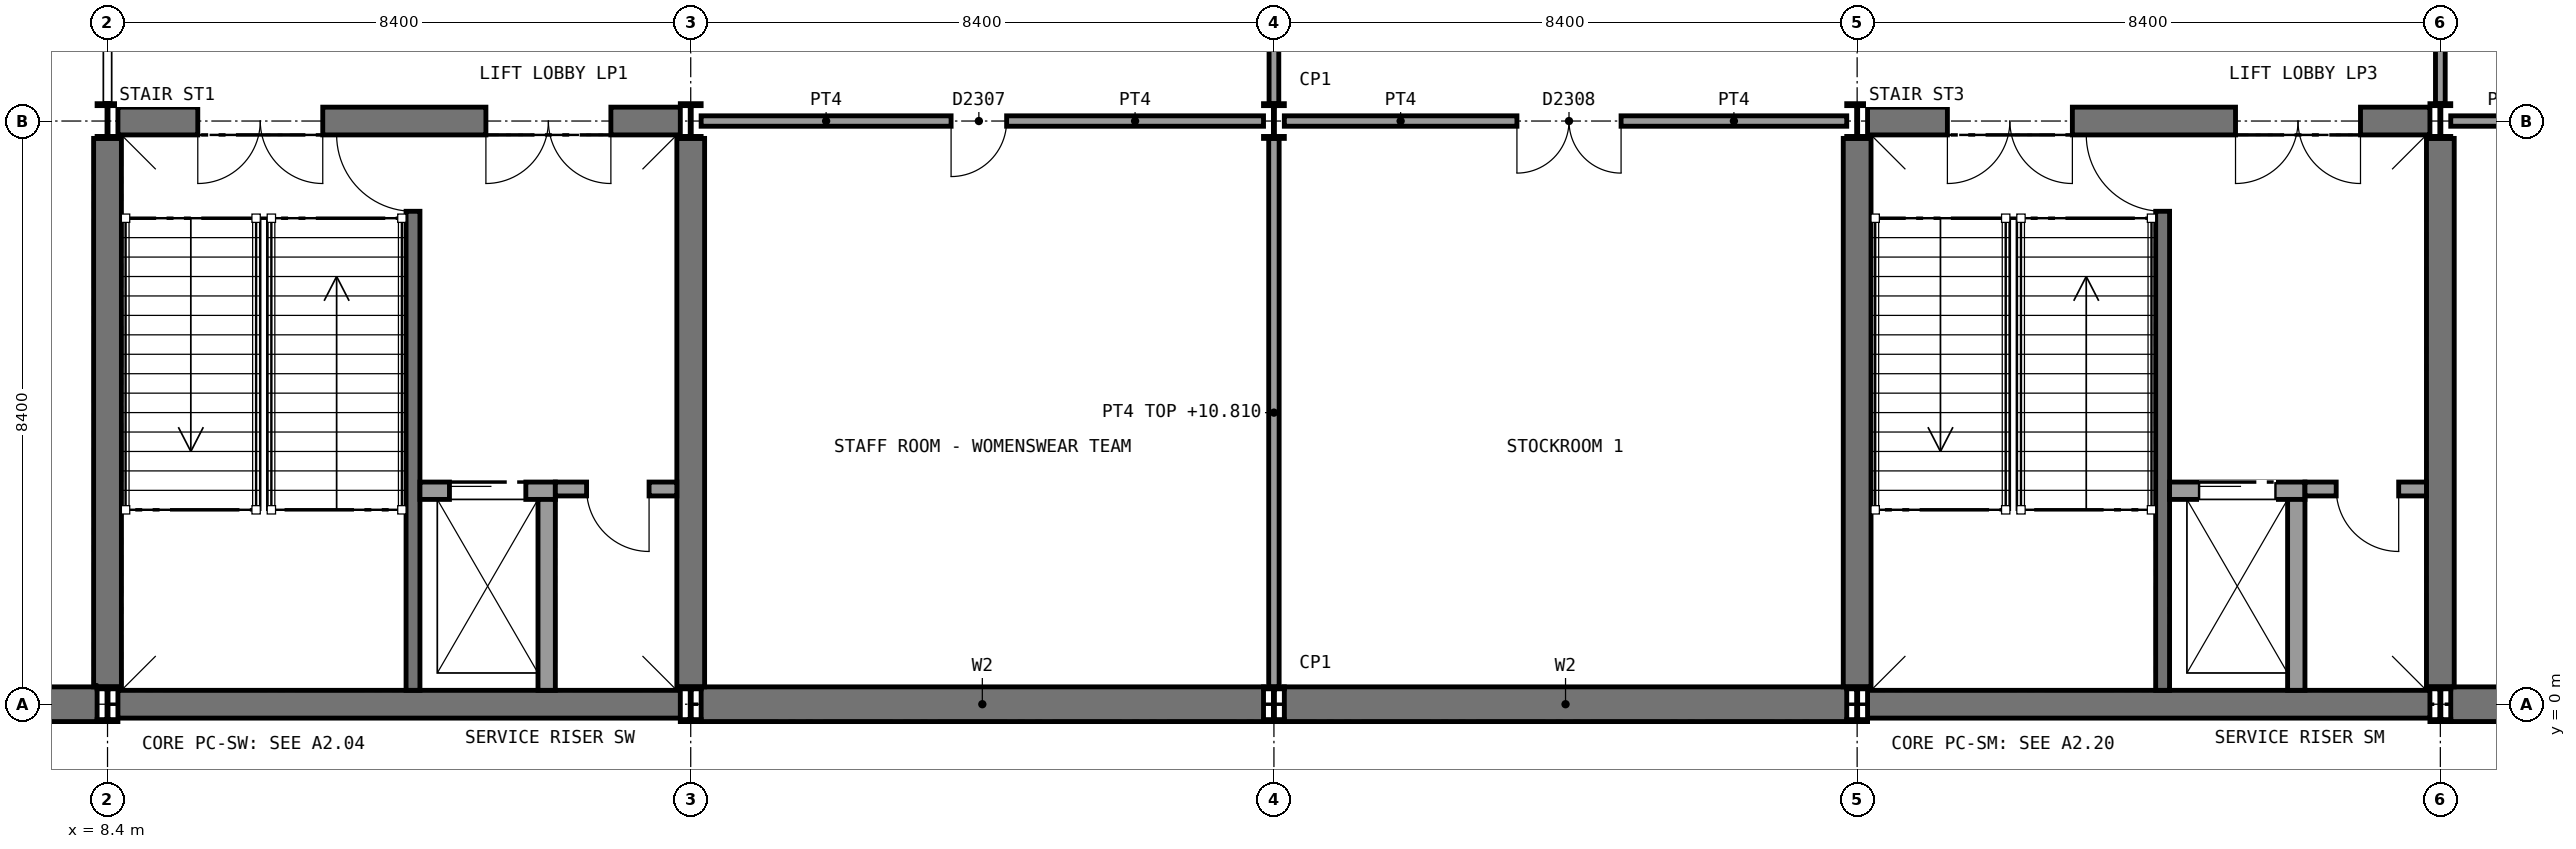
"""IFC4 building model, lengths in metres.
Left out: names, types, materials, properties, quantities, classifications, styles, units other than length and angle.
Written with IfcOpenShell. Run it as: python <this file> out.ifc"""

import sys

from ifc_helpers import new_model, si_unit, direction, frame, frame_2d, origin, origin_2d, place, context, subcontext, project, spatial, rectangle, i_section, extrude, element, fill, save


model = new_model("IFC4")
c1 = context("Model", 3, precision=1e-05, world=origin(), true_north=direction((0.0, 1.0)))
c2 = subcontext(c1, "Body", "Model", "MODEL_VIEW")
j1 = project(units=[si_unit("LENGTHUNIT", "METRE"), si_unit("PLANEANGLEUNIT", "RADIAN")], contexts=[c1])
p1 = place(None, origin())
s1 = spatial("IfcSite", under=j1, at=p1, CompositionType="ELEMENT")
p2 = place(p1, origin())
s2 = spatial("IfcBuilding", under=s1, at=p2, CompositionType="ELEMENT")
p3 = place(p2, frame((0.0, 0.0, 6.0)))
s3 = spatial("IfcBuildingStorey", under=s2, at=p3, CompositionType="ELEMENT", Elevation=6.0)
p4 = place(p3, frame((0.305, 0.0, 0.0), z_axis=(0.0, 0.0, 1.0), x_axis=(1.0, 0.0, 0.0)))
e1 = element("IfcWall", 1, at=p4, inside=s3, PredefinedType="SHEAR", context=c2, shape_type="SweptSolid", body=[
    extrude(rectangle(XDim=7.945, YDim=0.5, at=frame_2d((3.973, 0.0))), origin(), (0.0, 0.0, 1.0), 5.25),
])
p5 = place(p3, frame((16.95, 0.0, 0.0), z_axis=(0.0, 0.0, 1.0), x_axis=(1.0, 0.0, 0.0)))
e2 = element("IfcWall", 2, at=p5, inside=s3, PredefinedType="SHEAR", context=c2, shape_type="SweptSolid", body=[
    extrude(rectangle(XDim=8.1, YDim=0.5, at=frame_2d((4.05, 0.0))), origin(), (0.0, 0.0, 1.0), 5.25),
])
p6 = place(p3, frame((25.35, 0.0, 0.0), z_axis=(0.0, 0.0, 1.0), x_axis=(1.0, 0.0, 0.0)))
e3 = element("IfcWall", 3, at=p6, inside=s3, PredefinedType="SHEAR", context=c2, shape_type="SweptSolid", body=[
    extrude(rectangle(XDim=8.1, YDim=0.5, at=frame_2d((4.05, 0.0))), origin(), (0.0, 0.0, 1.0), 5.25),
])
p7 = place(p3, frame((42.15, 0.0, 0.0), z_axis=(0.0, 0.0, 1.0), x_axis=(1.0, 0.0, 0.0)))
e4 = element("IfcWall", 4, at=p7, inside=s3, PredefinedType="SHEAR", context=c2, shape_type="SweptSolid", body=[
    extrude(rectangle(XDim=8.1, YDim=0.5, at=frame_2d((4.05, 0.0))), origin(), (0.0, 0.0, 1.0), 5.25),
])
p8 = place(p3, frame((8.55, 0.0, 0.0), z_axis=(0.0, 0.0, 1.0), x_axis=(1.0, 0.0, 0.0)))
e5 = element("IfcWall", 5, at=p8, inside=s3, PredefinedType="SHEAR", context=c2, shape_type="SweptSolid", body=[
    extrude(rectangle(XDim=8.1, YDim=0.4, at=frame_2d((4.05, 0.0))), origin(), (0.0, 0.0, 1.0), 5.25),
])
p9 = place(p3, frame((8.55, 8.4, 0.0), z_axis=(0.0, 0.0, 1.0), x_axis=(1.0, 0.0, 0.0)))
e6 = element("IfcWall", 6, at=p9, inside=s3, PredefinedType="SHEAR", context=c2, shape_type="SweptSolid", body=[
    extrude(rectangle(XDim=8.1, YDim=0.4, at=frame_2d((4.05, 0.0))), origin(), (0.0, 0.0, 1.0), 5.25),
])
p10 = place(p9, frame((1.15, 0.0, 0.0)))
e7 = element("IfcOpeningElement", 7, at=p10, cuts=e6, PredefinedType="OPENING", context=c2, shape_type="SweptSolid", body=[
    extrude(rectangle(XDim=1.8, YDim=2.1, at=frame_2d((0.9, 1.05))), frame((0.0, 0.21, 0.0), z_axis=(0.0, -1.0, 0.0), x_axis=(1.0, 0.0, 0.0)), (0.0, 0.0, 1.0), 0.42),
])
p11 = place(p9, frame((5.3, 0.0, 0.0)))
e8 = element("IfcOpeningElement", 8, at=p11, cuts=e6, PredefinedType="OPENING", context=c2, shape_type="SweptSolid", body=[
    extrude(rectangle(XDim=1.8, YDim=2.1, at=frame_2d((0.9, 1.05))), frame((0.0, 0.21, 0.0), z_axis=(0.0, -1.0, 0.0), x_axis=(1.0, 0.0, 0.0)), (0.0, 0.0, 1.0), 0.42),
])
for number, where, z_axis, x_axis in (
    (9, (8.4, 0.25, 0.0), (0.0, 0.0, 1.0), (0.0, 1.0, 0.0)),
    (10, (16.8, 0.25, 0.0), (0.0, 0.0, 1.0), (0.0, 1.0, 0.0)),
):
    element("IfcWall", number, at=place(p3, frame(where, z_axis=z_axis, x_axis=x_axis)), inside=s3, PredefinedType="SHEAR", context=c2, shape_type="SweptSolid", body=[
        extrude(rectangle(XDim=7.9, YDim=0.4, at=frame_2d((3.95, 0.0))), origin(), (0.0, 0.0, 1.0), 5.25),
    ])
p12 = place(p3, frame((33.75, 0.0, 0.0), z_axis=(0.0, 0.0, 1.0), x_axis=(1.0, 0.0, 0.0)))
e11 = element("IfcWall", 11, at=p12, inside=s3, PredefinedType="SHEAR", context=c2, shape_type="SweptSolid", body=[
    extrude(rectangle(XDim=8.1, YDim=0.4, at=frame_2d((4.05, 0.0))), origin(), (0.0, 0.0, 1.0), 5.25),
])
p13 = place(p3, frame((33.75, 8.4, 0.0), z_axis=(0.0, 0.0, 1.0), x_axis=(1.0, 0.0, 0.0)))
e12 = element("IfcWall", 12, at=p13, inside=s3, PredefinedType="SHEAR", context=c2, shape_type="SweptSolid", body=[
    extrude(rectangle(XDim=8.1, YDim=0.4, at=frame_2d((4.05, 0.0))), origin(), (0.0, 0.0, 1.0), 5.25),
])
p14 = place(p13, frame((1.15, 0.0, 0.0)))
e13 = element("IfcOpeningElement", 13, at=p14, cuts=e12, PredefinedType="OPENING", context=c2, shape_type="SweptSolid", body=[
    extrude(rectangle(XDim=1.8, YDim=2.1, at=frame_2d((0.9, 1.05))), frame((0.0, 0.21, 0.0), z_axis=(0.0, -1.0, 0.0), x_axis=(1.0, 0.0, 0.0)), (0.0, 0.0, 1.0), 0.42),
])
p15 = place(p13, frame((5.3, 0.0, 0.0)))
e14 = element("IfcOpeningElement", 14, at=p15, cuts=e12, PredefinedType="OPENING", context=c2, shape_type="SweptSolid", body=[
    extrude(rectangle(XDim=1.8, YDim=2.1, at=frame_2d((0.9, 1.05))), frame((0.0, 0.21, 0.0), z_axis=(0.0, -1.0, 0.0), x_axis=(1.0, 0.0, 0.0)), (0.0, 0.0, 1.0), 0.42),
])
for number, where, z_axis, x_axis in (
    (15, (33.6, 0.25, 0.0), (0.0, 0.0, 1.0), (0.0, 1.0, 0.0)),
    (16, (42.0, 0.25, 0.0), (0.0, 0.0, 1.0), (0.0, 1.0, 0.0)),
):
    element("IfcWall", number, at=place(p3, frame(where, z_axis=z_axis, x_axis=x_axis)), inside=s3, PredefinedType="SHEAR", context=c2, shape_type="SweptSolid", body=[
        extrude(rectangle(XDim=7.9, YDim=0.4, at=frame_2d((3.95, 0.0))), origin(), (0.0, 0.0, 1.0), 5.25),
    ])
for number, where, z_axis, x_axis in (
    (17, (8.4, 0.0, 0.0), (0.0, 0.0, 1.0), (1.0, 0.0, 0.0)),
    (18, (8.4, 8.4, 0.0), (0.0, 0.0, 1.0), (1.0, 0.0, 0.0)),
    (19, (16.8, 0.0, 0.0), (0.0, 0.0, 1.0), (1.0, 0.0, 0.0)),
    (20, (16.8, 8.4, 0.0), (0.0, 0.0, 1.0), (1.0, 0.0, 0.0)),
    (21, (25.2, 0.0, 0.0), (0.0, 0.0, 1.0), (1.0, 0.0, 0.0)),
    (22, (25.2, 8.4, 0.0), (0.0, 0.0, 1.0), (1.0, 0.0, 0.0)),
    (23, (33.6, 0.0, 0.0), (0.0, 0.0, 1.0), (1.0, 0.0, 0.0)),
    (24, (33.6, 8.4, 0.0), (0.0, 0.0, 1.0), (1.0, 0.0, 0.0)),
    (25, (42.0, 0.0, 0.0), (0.0, 0.0, 1.0), (1.0, 0.0, 0.0)),
    (26, (42.0, 8.4, 0.0), (0.0, 0.0, 1.0), (1.0, 0.0, 0.0)),
):
    element("IfcColumn", number, at=place(p3, frame(where, z_axis=z_axis, x_axis=x_axis)), inside=s3, PredefinedType="COLUMN", context=c2, shape_type="SweptSolid", body=[
        extrude(i_section(OverallWidth=0.3, OverallDepth=0.5, WebThickness=0.014, FlangeThickness=0.028, FilletRadius=0.027, at=origin_2d()), origin(), (0.0, 0.0, 1.0), 5.4),
    ])
p16 = place(p3, frame((25.2, 0.25, 0.0), z_axis=(0.0, 0.0, 1.0), x_axis=(0.0, 1.0, 0.0)))
e27 = element("IfcWall", 27, at=p16, inside=s3, PredefinedType="SOLIDWALL", context=c2, shape_type="SweptSolid", body=[
    extrude(rectangle(XDim=7.9, YDim=0.15, at=frame_2d((3.95, 0.0))), origin(), (0.0, 0.0, 1.0), 4.81),
])
p17 = place(p3, frame((16.95, 8.4, 0.0), z_axis=(0.0, 0.0, 1.0), x_axis=(1.0, 0.0, 0.0)))
e28 = element("IfcWall", 28, at=p17, inside=s3, PredefinedType="SOLIDWALL", context=c2, shape_type="SweptSolid", body=[
    extrude(rectangle(XDim=8.1, YDim=0.15, at=frame_2d((4.05, 0.0))), origin(), (0.0, 0.0, 1.0), 4.92),
])
p18 = place(p17, frame((3.6, 0.0, 0.0)))
e29 = element("IfcOpeningElement", 29, at=p18, cuts=e28, PredefinedType="OPENING", context=c2, shape_type="SweptSolid", body=[
    extrude(rectangle(XDim=0.8, YDim=2.1, at=frame_2d((0.4, 1.05))), frame((0.0, 0.085, 0.0), z_axis=(0.0, -1.0, 0.0), x_axis=(1.0, 0.0, 0.0)), (0.0, 0.0, 1.0), 0.17),
])
p19 = place(p3, frame((25.35, 8.4, 0.0), z_axis=(0.0, 0.0, 1.0), x_axis=(1.0, 0.0, 0.0)))
e30 = element("IfcWall", 30, at=p19, inside=s3, PredefinedType="SOLIDWALL", context=c2, shape_type="SweptSolid", body=[
    extrude(rectangle(XDim=8.1, YDim=0.15, at=frame_2d((4.05, 0.0))), origin(), (0.0, 0.0, 1.0), 4.92),
])
p20 = place(p19, frame((3.35, 0.0, 0.0)))
e31 = element("IfcOpeningElement", 31, at=p20, cuts=e30, PredefinedType="OPENING", context=c2, shape_type="SweptSolid", body=[
    extrude(rectangle(XDim=1.5, YDim=2.1, at=frame_2d((0.75, 1.05))), frame((0.0, 0.085, 0.0), z_axis=(0.0, -1.0, 0.0), x_axis=(1.0, 0.0, 0.0)), (0.0, 0.0, 1.0), 0.17),
])
p21 = place(p3, frame((42.15, 8.4, 0.0), z_axis=(0.0, 0.0, 1.0), x_axis=(1.0, 0.0, 0.0)))
e32 = element("IfcWall", 32, at=p21, inside=s3, PredefinedType="SOLIDWALL", context=c2, shape_type="SweptSolid", body=[
    extrude(rectangle(XDim=8.1, YDim=0.15, at=frame_2d((4.05, 0.0))), origin(), (0.0, 0.0, 1.0), 4.81),
])
p22 = place(p21, frame((3.35, 0.0, 0.0)))
e33 = element("IfcOpeningElement", 33, at=p22, cuts=e32, PredefinedType="OPENING", context=c2, shape_type="SweptSolid", body=[
    extrude(rectangle(XDim=1.5, YDim=2.1, at=frame_2d((0.75, 1.05))), frame((0.0, 0.085, 0.0), z_axis=(0.0, -1.0, 0.0), x_axis=(1.0, 0.0, 0.0)), (0.0, 0.0, 1.0), 0.17),
])
for number, where, z_axis, x_axis in (
    (34, (25.2, 8.65, 0.0), (0.0, 0.0, 1.0), (0.0, 1.0, 0.0)),
    (35, (42.0, 8.65, 0.0), (0.0, 0.0, 1.0), (0.0, 1.0, 0.0)),
):
    element("IfcWall", number, at=place(p3, frame(where, z_axis=z_axis, x_axis=x_axis)), inside=s3, PredefinedType="PARTITIONING", context=c2, shape_type="SweptSolid", body=[
        extrude(rectangle(XDim=3.1, YDim=0.14, at=frame_2d((1.55, 0.0))), origin(), (0.0, 0.0, 1.0), 4.81),
    ])
p23 = place(p3, frame((12.8, 0.2, 0.0), z_axis=(0.0, 0.0, 1.0), x_axis=(0.0, 1.0, 0.0)))
e36 = element("IfcWall", 36, at=p23, inside=s3, PredefinedType="SHEAR", context=c2, shape_type="SweptSolid", body=[
    extrude(rectangle(XDim=8.0, YDim=0.2, at=frame_2d((4.0, 0.0))), origin(), (0.0, 0.0, 1.0), 5.25),
])
p24 = place(p23, frame((6.9, 0.0, 0.0)))
e37 = element("IfcOpeningElement", 37, at=p24, cuts=e36, PredefinedType="OPENING", context=c2, shape_type="SweptSolid", body=[
    extrude(rectangle(XDim=1.11, YDim=2.1, at=frame_2d((0.555, 1.05))), frame((0.0, 0.11, 0.0), z_axis=(0.0, -1.0, 0.0), x_axis=(1.0, 0.0, 0.0)), (0.0, 0.0, 1.0), 0.22),
])
p25 = place(p3, frame((12.9, 3.075, 0.0), z_axis=(0.0, 0.0, 1.0), x_axis=(1.0, 0.0, 0.0)))
e38 = element("IfcWall", 38, at=p25, inside=s3, PredefinedType="SOLIDWALL", context=c2, shape_type="SweptSolid", body=[
    extrude(rectangle(XDim=1.95, YDim=0.25, at=frame_2d((0.975, 0.0))), origin(), (0.0, 0.0, 1.0), 5.4),
])
p26 = place(p25, frame((0.425, 0.0, 0.0)))
e39 = element("IfcOpeningElement", 39, at=p26, cuts=e38, PredefinedType="OPENING", context=c2, shape_type="SweptSolid", body=[
    extrude(rectangle(XDim=1.1, YDim=2.1, at=frame_2d((0.55, 1.05))), frame((0.0, 0.135, 0.0), z_axis=(0.0, -1.0, 0.0), x_axis=(1.0, 0.0, 0.0)), (0.0, 0.0, 1.0), 0.27),
])
p27 = place(p3, frame((14.725, 0.2, 0.0), z_axis=(0.0, 0.0, 1.0), x_axis=(0.0, 1.0, 0.0)))
e40 = element("IfcWall", 40, at=p27, inside=s3, PredefinedType="SOLIDWALL", context=c2, shape_type="SweptSolid", body=[
    extrude(rectangle(XDim=2.75, YDim=0.25, at=frame_2d((1.375, 0.0))), origin(), (0.0, 0.0, 1.0), 5.4),
])
p28 = place(p3, frame((14.85, 3.1, 0.0), z_axis=(0.0, 0.0, 1.0), x_axis=(1.0, 0.0, 0.0)))
e41 = element("IfcWall", 41, at=p28, inside=s3, PredefinedType="PARTITIONING", context=c2, shape_type="SweptSolid", body=[
    extrude(rectangle(XDim=1.75, YDim=0.2, at=frame_2d((0.875, 0.0))), origin(), (0.0, 0.0, 1.0), 5.25),
])
p29 = place(p28, frame((0.45, 0.0, 0.0)))
e42 = element("IfcOpeningElement", 42, at=p29, cuts=e41, PredefinedType="OPENING", context=c2, shape_type="SweptSolid", body=[
    extrude(rectangle(XDim=0.9, YDim=2.1, at=frame_2d((0.45, 1.05))), frame((0.0, 0.11, 0.0), z_axis=(0.0, -1.0, 0.0), x_axis=(1.0, 0.0, 0.0)), (0.0, 0.0, 1.0), 0.22),
])
p30 = place(p3, frame((38.0, 0.2, 0.0), z_axis=(0.0, 0.0, 1.0), x_axis=(0.0, 1.0, 0.0)))
e43 = element("IfcWall", 43, at=p30, inside=s3, PredefinedType="SHEAR", context=c2, shape_type="SweptSolid", body=[
    extrude(rectangle(XDim=8.0, YDim=0.2, at=frame_2d((4.0, 0.0))), origin(), (0.0, 0.0, 1.0), 5.25),
])
p31 = place(p30, frame((6.9, 0.0, 0.0)))
e44 = element("IfcOpeningElement", 44, at=p31, cuts=e43, PredefinedType="OPENING", context=c2, shape_type="SweptSolid", body=[
    extrude(rectangle(XDim=1.11, YDim=2.1, at=frame_2d((0.555, 1.05))), frame((0.0, 0.11, 0.0), z_axis=(0.0, -1.0, 0.0), x_axis=(1.0, 0.0, 0.0)), (0.0, 0.0, 1.0), 0.22),
])
p32 = place(p3, frame((38.1, 3.075, 0.0), z_axis=(0.0, 0.0, 1.0), x_axis=(1.0, 0.0, 0.0)))
e45 = element("IfcWall", 45, at=p32, inside=s3, PredefinedType="SOLIDWALL", context=c2, shape_type="SweptSolid", body=[
    extrude(rectangle(XDim=1.95, YDim=0.25, at=frame_2d((0.975, 0.0))), origin(), (0.0, 0.0, 1.0), 5.4),
])
p33 = place(p32, frame((0.425, 0.0, 0.0)))
e46 = element("IfcOpeningElement", 46, at=p33, cuts=e45, PredefinedType="OPENING", context=c2, shape_type="SweptSolid", body=[
    extrude(rectangle(XDim=1.1, YDim=2.1, at=frame_2d((0.55, 1.05))), frame((0.0, 0.135, 0.0), z_axis=(0.0, -1.0, 0.0), x_axis=(1.0, 0.0, 0.0)), (0.0, 0.0, 1.0), 0.27),
])
p34 = place(p3, frame((39.925, 0.2, 0.0), z_axis=(0.0, 0.0, 1.0), x_axis=(0.0, 1.0, 0.0)))
e47 = element("IfcWall", 47, at=p34, inside=s3, PredefinedType="SOLIDWALL", context=c2, shape_type="SweptSolid", body=[
    extrude(rectangle(XDim=2.75, YDim=0.25, at=frame_2d((1.375, 0.0))), origin(), (0.0, 0.0, 1.0), 5.4),
])
p35 = place(p3, frame((40.05, 3.1, 0.0), z_axis=(0.0, 0.0, 1.0), x_axis=(1.0, 0.0, 0.0)))
e48 = element("IfcWall", 48, at=p35, inside=s3, PredefinedType="PARTITIONING", context=c2, shape_type="SweptSolid", body=[
    extrude(rectangle(XDim=1.75, YDim=0.2, at=frame_2d((0.875, 0.0))), origin(), (0.0, 0.0, 1.0), 5.25),
])
p36 = place(p35, frame((0.45, 0.0, 0.0)))
e49 = element("IfcOpeningElement", 49, at=p36, cuts=e48, PredefinedType="OPENING", context=c2, shape_type="SweptSolid", body=[
    extrude(rectangle(XDim=0.9, YDim=2.1, at=frame_2d((0.45, 1.05))), frame((0.0, 0.11, 0.0), z_axis=(0.0, -1.0, 0.0), x_axis=(1.0, 0.0, 0.0)), (0.0, 0.0, 1.0), 0.22),
])
p37 = place(p18, frame((0.8, 0.0, 0.0), z_axis=(0.0, 0.0, 1.0), x_axis=(-1.0, 0.0, 0.0)))
e50 = element("IfcDoor", 50, at=p37, inside=s3, OperationType="SINGLE_SWING_RIGHT", PredefinedType="DOOR", context=c2, shape_type="SweptSolid", body=[
    extrude(rectangle(XDim=0.8, YDim=2.1, at=frame_2d((0.4, 1.05))), frame((0.0, 0.025, 0.0), z_axis=(0.0, -1.0, 0.0), x_axis=(1.0, 0.0, 0.0)), (0.0, 0.0, 1.0), 0.05),
])
fill(e29, e50)
p38 = place(p20, frame((1.5, 0.0, 0.0), z_axis=(0.0, 0.0, 1.0), x_axis=(-1.0, 0.0, 0.0)))
e51 = element("IfcDoor", 51, at=p38, inside=s3, OperationType="DOUBLE_DOOR_SINGLE_SWING", PredefinedType="DOOR", context=c2, shape_type="SweptSolid", body=[
    extrude(rectangle(XDim=1.5, YDim=2.1, at=frame_2d((0.75, 1.05))), frame((0.0, 0.025, 0.0), z_axis=(0.0, -1.0, 0.0), x_axis=(1.0, 0.0, 0.0)), (0.0, 0.0, 1.0), 0.05),
])
fill(e31, e51)
p39 = place(p24, origin())
e52 = element("IfcDoor", 52, at=p39, inside=s3, OperationType="SINGLE_SWING_RIGHT", PredefinedType="DOOR", context=c2, shape_type="SweptSolid", body=[
    extrude(rectangle(XDim=1.1, YDim=2.1, at=frame_2d((0.55, 1.05))), frame((0.0, 0.025, 0.0), z_axis=(0.0, -1.0, 0.0), x_axis=(1.0, 0.0, 0.0)), (0.0, 0.0, 1.0), 0.05),
])
fill(e37, e52)
p40 = place(p26, origin())
e53 = element("IfcDoor", 53, at=p40, inside=s3, OperationType="SLIDING_TO_LEFT", PredefinedType="DOOR", context=c2, shape_type="SweptSolid", body=[
    extrude(rectangle(XDim=1.1, YDim=2.1, at=frame_2d((0.55, 1.05))), frame((0.0, 0.025, 0.0), z_axis=(0.0, -1.0, 0.0), x_axis=(1.0, 0.0, 0.0)), (0.0, 0.0, 1.0), 0.05),
])
fill(e39, e53)
p41 = place(p29, frame((0.9, 0.0, 0.0), z_axis=(0.0, 0.0, 1.0), x_axis=(-1.0, 0.0, 0.0)))
e54 = element("IfcDoor", 54, at=p41, inside=s3, OperationType="SINGLE_SWING_LEFT", PredefinedType="DOOR", context=c2, shape_type="SweptSolid", body=[
    extrude(rectangle(XDim=0.9, YDim=2.1, at=frame_2d((0.45, 1.05))), frame((0.0, 0.025, 0.0), z_axis=(0.0, -1.0, 0.0), x_axis=(1.0, 0.0, 0.0)), (0.0, 0.0, 1.0), 0.05),
])
fill(e42, e54)
p42 = place(p10, frame((1.8, 0.0, 0.0), z_axis=(0.0, 0.0, 1.0), x_axis=(-1.0, 0.0, 0.0)))
e55 = element("IfcDoor", 55, at=p42, inside=s3, OperationType="DOUBLE_DOOR_SINGLE_SWING", PredefinedType="DOOR", context=c2, shape_type="SweptSolid", body=[
    extrude(rectangle(XDim=1.8, YDim=2.1, at=frame_2d((0.9, 1.05))), frame((0.0, 0.025, 0.0), z_axis=(0.0, -1.0, 0.0), x_axis=(1.0, 0.0, 0.0)), (0.0, 0.0, 1.0), 0.05),
])
fill(e7, e55)
p43 = place(p11, frame((1.8, 0.0, 0.0), z_axis=(0.0, 0.0, 1.0), x_axis=(-1.0, 0.0, 0.0)))
e56 = element("IfcDoor", 56, at=p43, inside=s3, OperationType="DOUBLE_DOOR_SINGLE_SWING", PredefinedType="DOOR", context=c2, shape_type="SweptSolid", body=[
    extrude(rectangle(XDim=1.8, YDim=2.1, at=frame_2d((0.9, 1.05))), frame((0.0, 0.025, 0.0), z_axis=(0.0, -1.0, 0.0), x_axis=(1.0, 0.0, 0.0)), (0.0, 0.0, 1.0), 0.05),
])
fill(e8, e56)
p44 = place(p31, origin())
e57 = element("IfcDoor", 57, at=p44, inside=s3, OperationType="SINGLE_SWING_RIGHT", PredefinedType="DOOR", context=c2, shape_type="SweptSolid", body=[
    extrude(rectangle(XDim=1.1, YDim=2.1, at=frame_2d((0.55, 1.05))), frame((0.0, 0.025, 0.0), z_axis=(0.0, -1.0, 0.0), x_axis=(1.0, 0.0, 0.0)), (0.0, 0.0, 1.0), 0.05),
])
fill(e44, e57)
p45 = place(p33, origin())
e58 = element("IfcDoor", 58, at=p45, inside=s3, OperationType="SLIDING_TO_LEFT", PredefinedType="DOOR", context=c2, shape_type="SweptSolid", body=[
    extrude(rectangle(XDim=1.1, YDim=2.1, at=frame_2d((0.55, 1.05))), frame((0.0, 0.025, 0.0), z_axis=(0.0, -1.0, 0.0), x_axis=(1.0, 0.0, 0.0)), (0.0, 0.0, 1.0), 0.05),
])
fill(e46, e58)
p46 = place(p36, frame((0.9, 0.0, 0.0), z_axis=(0.0, 0.0, 1.0), x_axis=(-1.0, 0.0, 0.0)))
e59 = element("IfcDoor", 59, at=p46, inside=s3, OperationType="SINGLE_SWING_LEFT", PredefinedType="DOOR", context=c2, shape_type="SweptSolid", body=[
    extrude(rectangle(XDim=0.9, YDim=2.1, at=frame_2d((0.45, 1.05))), frame((0.0, 0.025, 0.0), z_axis=(0.0, -1.0, 0.0), x_axis=(1.0, 0.0, 0.0)), (0.0, 0.0, 1.0), 0.05),
])
fill(e49, e59)
p47 = place(p14, frame((1.8, 0.0, 0.0), z_axis=(0.0, 0.0, 1.0), x_axis=(-1.0, 0.0, 0.0)))
e60 = element("IfcDoor", 60, at=p47, inside=s3, OperationType="DOUBLE_DOOR_SINGLE_SWING", PredefinedType="DOOR", context=c2, shape_type="SweptSolid", body=[
    extrude(rectangle(XDim=1.8, YDim=2.1, at=frame_2d((0.9, 1.05))), frame((0.0, 0.025, 0.0), z_axis=(0.0, -1.0, 0.0), x_axis=(1.0, 0.0, 0.0)), (0.0, 0.0, 1.0), 0.05),
])
fill(e13, e60)
p48 = place(p15, frame((1.8, 0.0, 0.0), z_axis=(0.0, 0.0, 1.0), x_axis=(-1.0, 0.0, 0.0)))
e61 = element("IfcDoor", 61, at=p48, inside=s3, OperationType="DOUBLE_DOOR_SINGLE_SWING", PredefinedType="DOOR", context=c2, shape_type="SweptSolid", body=[
    extrude(rectangle(XDim=1.8, YDim=2.1, at=frame_2d((0.9, 1.05))), frame((0.0, 0.025, 0.0), z_axis=(0.0, -1.0, 0.0), x_axis=(1.0, 0.0, 0.0)), (0.0, 0.0, 1.0), 0.05),
])
fill(e14, e61)
save(model, sys.argv[1])
